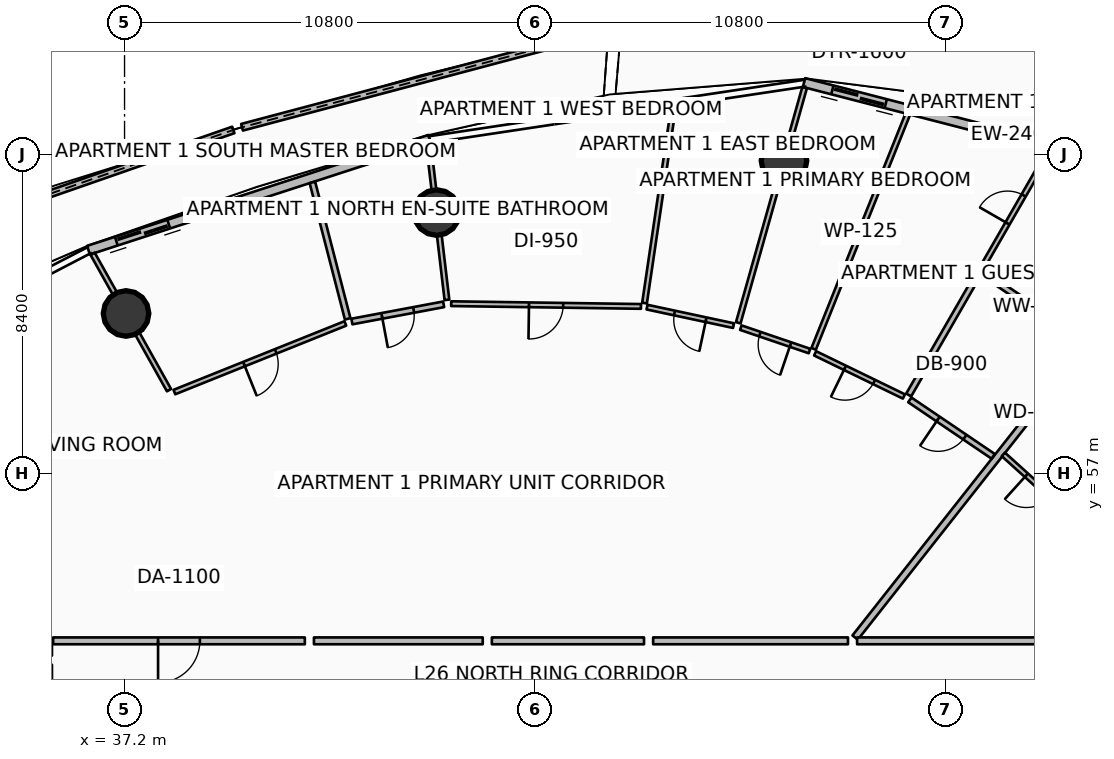
"""IFC4 building model, lengths in metres.
Left out: names, types, materials, properties, quantities, classifications, styles, units other than length and angle.
Written with IfcOpenShell. Run it as: python <this file> out.ifc"""

import sys

from ifc_helpers import new_model, si_unit, direction, frame, frame_2d, origin, origin_2d, place, context, subcontext, project, spatial, polyline, rectangle, circle, outline, extrude, element, fill, save


model = new_model("IFC4")
c1 = context("Model", 3, precision=1e-05, world=origin(), true_north=direction((0.0, 1.0)))
c2 = subcontext(c1, "Body", "Model", "MODEL_VIEW")
j1 = project(units=[si_unit("LENGTHUNIT", "METRE"), si_unit("PLANEANGLEUNIT", "RADIAN")], contexts=[c1])
p1 = place(None, origin())
s1 = spatial("IfcSite", under=j1, at=p1, CompositionType="ELEMENT")
p2 = place(p1, origin())
s2 = spatial("IfcBuilding", under=s1, at=p2, CompositionType="ELEMENT")
p3 = place(p2, frame((0.0, 0.0, 105.15)))
s3 = spatial("IfcBuildingStorey", under=s2, at=p3, CompositionType="ELEMENT", Elevation=105.15)
for number, where, z_axis, x_axis in (
    (1, (54.553, 65.234, 0.0), (0.0, 0.0, 1.0), (1.0, 0.0, 0.0)),
    (2, (45.412, 63.869, 0.0), (0.0, 0.0, 1.0), (1.0, 0.0, 0.0)),
    (3, (37.24, 61.214, 0.0), (0.0, 0.0, 1.0), (1.0, 0.0, 0.0)),
):
    element("IfcColumn", number, at=place(p3, frame(where, z_axis=z_axis, x_axis=x_axis)), inside=s3, PredefinedType="COLUMN", context=c2, shape_type="SweptSolid", body=[
        extrude(circle(Radius=0.6, at=origin_2d()), origin(), (0.0, 0.0, 1.0), 3.5),
    ])
p4 = place(p3, frame((49.935, 68.672, 0.0), z_axis=(0.0, 0.0, 1.0), x_axis=(-0.966557844724, -0.25644869429, 0.0)))
e4 = element("IfcWall", 4, at=p4, inside=s3, PredefinedType="PARAPET", context=c2, shape_type="SweptSolid", body=[
    extrude(outline(polyline([(0.0, 0.0), (9.978, 0.0), (9.978, 1.148), (4.989, 1.127), (0.0, 1.224), (0.0, 0.0)])), frame((0.0, 0.09, 0.0), z_axis=(0.0, -1.0, 0.0), x_axis=(1.0, 0.0, 0.0)), (0.0, 0.0, 1.0), 0.18),
])
p5 = place(p3, frame((40.062, 66.043, 0.0), z_axis=(0.0, 0.0, 1.0), x_axis=(-0.944336605893, -0.328980812161, 0.0)))
e5 = element("IfcWall", 5, at=p5, inside=s3, PredefinedType="PARAPET", context=c2, shape_type="SweptSolid", body=[
    extrude(outline(polyline([(0.0, 0.0), (10.102, 0.0), (10.102, 1.483), (5.051, 1.284), (0.0, 1.148), (0.0, 0.0)])), frame((0.0, 0.09, 0.0), z_axis=(0.0, -1.0, 0.0), x_axis=(1.0, 0.0, 0.0)), (0.0, 0.0, 1.0), 0.18),
])
p6 = place(p3, frame((65.814, 64.523, 0.0), z_axis=(0.0, 0.0, 1.0), x_axis=(-0.968356180858, 0.249572248045, 0.0)))
e6 = element("IfcWall", 6, at=p6, inside=s3, PredefinedType="SOLIDWALL", context=c2, shape_type="SweptSolid", body=[
    extrude(rectangle(XDim=11.084, YDim=0.24, at=frame_2d((5.542, 0.0))), origin(), (0.0, 0.0, 1.0), 2.45),
])
p7 = place(p6, frame((8.865, 0.0, 0.0)))
e7 = element("IfcOpeningElement", 7, at=p7, cuts=e6, PredefinedType="OPENING", context=c2, shape_type="SweptSolid", body=[
    extrude(rectangle(XDim=1.45, YDim=2.15, at=frame_2d((0.725, 1.075))), frame((0.0, 0.13, 0.0), z_axis=(0.0, -1.0, 0.0), x_axis=(1.0, 0.0, 0.0)), (0.0, 0.0, 1.0), 0.26),
])
p8 = place(p6, frame((0.28, 0.0, 0.65)))
e8 = element("IfcOpeningElement", 8, at=p8, cuts=e6, PredefinedType="OPENING", context=c2, shape_type="SweptSolid", body=[
    extrude(rectangle(XDim=1.6, YDim=1.5, at=frame_2d((0.8, 0.75))), frame((0.0, 0.13, 0.0), z_axis=(0.0, -1.0, 0.0), x_axis=(1.0, 0.0, 0.0)), (0.0, 0.0, 1.0), 0.26),
])
p9 = place(p3, frame((45.233, 65.797, 0.0), z_axis=(0.0, 0.0, 1.0), x_axis=(-0.951052494852, -0.30902937083, 0.0)))
e9 = element("IfcWall", 9, at=p9, inside=s3, PredefinedType="SOLIDWALL", context=c2, shape_type="SweptSolid", body=[
    extrude(rectangle(XDim=9.444, YDim=0.24, at=frame_2d((4.722, 0.0))), origin(), (0.0, 0.0, 1.0), 2.45),
])
p10 = place(p9, frame((7.224, 0.0, 0.0)))
e10 = element("IfcOpeningElement", 10, at=p10, cuts=e9, PredefinedType="OPENING", context=c2, shape_type="SweptSolid", body=[
    extrude(rectangle(XDim=1.45, YDim=2.15, at=frame_2d((0.725, 1.075))), frame((0.0, 0.13, 0.0), z_axis=(0.0, -1.0, 0.0), x_axis=(1.0, 0.0, 0.0)), (0.0, 0.0, 1.0), 0.26),
])
p11 = place(p9, frame((0.28, 0.0, 0.65)))
e11 = element("IfcOpeningElement", 11, at=p11, cuts=e9, PredefinedType="OPENING", context=c2, shape_type="SweptSolid", body=[
    extrude(rectangle(XDim=1.6, YDim=1.5, at=frame_2d((0.8, 0.75))), frame((0.0, 0.13, 0.0), z_axis=(0.0, -1.0, 0.0), x_axis=(1.0, 0.0, 0.0)), (0.0, 0.0, 1.0), 0.26),
])
p12 = place(p3, frame((56.425, 52.686, 0.0), z_axis=(0.0, 0.0, 1.0), x_axis=(0.619083417853, 0.785325233098, 0.0)))
e12 = element("IfcWall", 12, at=p12, inside=s3, PredefinedType="PARTITIONING", context=c2, shape_type="SweptSolid", body=[
    extrude(rectangle(XDim=15.063, YDim=0.18, at=frame_2d((7.532, 0.0))), origin(), (0.0, 0.0, 1.0), 2.94),
])
p13 = place(p3, frame((41.944, 52.6, 0.0), z_axis=(0.0, 0.0, 1.0), x_axis=(-1.0, 0.0, 0.0)))
e13 = element("IfcWall", 13, at=p13, inside=s3, PredefinedType="PARTITIONING", context=c2, shape_type="SweptSolid", body=[
    extrude(rectangle(XDim=6.624, YDim=0.18, at=frame_2d((3.312, 0.0))), origin(), (0.0, 0.0, 1.0), 2.94),
])
p14 = place(p13, frame((2.762, 0.0, 0.0)))
e14 = element("IfcOpeningElement", 14, at=p14, cuts=e13, PredefinedType="OPENING", context=c2, shape_type="SweptSolid", body=[
    extrude(rectangle(XDim=1.1, YDim=2.1, at=frame_2d((0.55, 1.05))), frame((0.0, 0.1, 0.0), z_axis=(0.0, -1.0, 0.0), x_axis=(1.0, 0.0, 0.0)), (0.0, 0.0, 1.0), 0.2),
])
p15 = place(p3, frame((56.236, 52.6, 0.0), z_axis=(0.0, 0.0, 1.0), x_axis=(-1.0, 0.0, 0.0)))
e15 = element("IfcWall", 15, at=p15, inside=s3, PredefinedType="PARTITIONING", context=c2, shape_type="SweptSolid", body=[
    extrude(rectangle(XDim=5.127, YDim=0.18, at=frame_2d((2.563, 0.0))), origin(), (0.0, 0.0, 1.0), 2.94),
])
p16 = place(p3, frame((60.057, 57.455, 0.0), z_axis=(0.0, 0.0, 1.0), x_axis=(-0.828073269886, 0.560619888783, 0.0)))
e16 = element("IfcWall", 16, at=p16, inside=s3, PredefinedType="PARTITIONING", context=c2, shape_type="SweptSolid", body=[
    extrude(rectangle(XDim=2.649, YDim=0.15, at=frame_2d((1.324, 0.0))), origin(), (0.0, 0.0, 1.0), 2.94),
])
p17 = place(p16, frame((0.899, 0.0, 0.0)))
e17 = element("IfcOpeningElement", 17, at=p17, cuts=e16, PredefinedType="OPENING", context=c2, shape_type="SweptSolid", body=[
    extrude(rectangle(XDim=0.85, YDim=2.06, at=frame_2d((0.425, 1.03))), frame((0.0, 0.085, 0.0), z_axis=(0.0, -1.0, 0.0), x_axis=(1.0, 0.0, 0.0)), (0.0, 0.0, 1.0), 0.17),
])
p18 = place(p3, frame((62.44, 60.479, 0.0), z_axis=(0.0, 0.0, 1.0), x_axis=(-0.828057808374, 0.560642725798, 0.0)))
e18 = element("IfcWall", 18, at=p18, inside=s3, PredefinedType="PARTITIONING", context=c2, shape_type="SweptSolid", body=[
    extrude(rectangle(XDim=3.206, YDim=0.15, at=frame_2d((1.603, 0.0))), origin(), (0.0, 0.0, 1.0), 2.94),
])
p19 = place(p3, frame((57.834, 59.069, 0.0), z_axis=(0.0, 0.0, 1.0), x_axis=(0.49925269443, 0.866456431164, 0.0)))
e19 = element("IfcWall", 19, at=p19, inside=s3, PredefinedType="PARTITIONING", context=c2, shape_type="SweptSolid", body=[
    extrude(rectangle(XDim=3.72, YDim=0.15, at=frame_2d((1.86, 0.0))), origin(), (0.0, 0.0, 1.0), 2.94),
])
p20 = place(p3, frame((59.756, 62.405, 0.0), z_axis=(0.0, 0.0, 1.0), x_axis=(0.499189934721, 0.866492590316, 0.0)))
e20 = element("IfcWall", 20, at=p20, inside=s3, PredefinedType="PARTITIONING", context=c2, shape_type="SweptSolid", body=[
    extrude(rectangle(XDim=3.573, YDim=0.125, at=frame_2d((1.786, 0.0))), origin(), (0.0, 0.0, 1.0), 2.94),
])
p21 = place(p20, frame((1.361, 0.0, 0.0)))
e21 = element("IfcOpeningElement", 21, at=p21, cuts=e20, PredefinedType="OPENING", context=c2, shape_type="SweptSolid", body=[
    extrude(rectangle(XDim=0.85, YDim=2.06, at=frame_2d((0.425, 1.03))), frame((0.0, 0.073, 0.0), z_axis=(0.0, -1.0, 0.0), x_axis=(1.0, 0.0, 0.0)), (0.0, 0.0, 1.0), 0.145),
])
p22 = place(p3, frame((55.333, 60.283, 0.0), z_axis=(0.0, 0.0, 1.0), x_axis=(0.372282601369, 0.928119423737, 0.0)))
e22 = element("IfcWall", 22, at=p22, inside=s3, PredefinedType="PARTITIONING", context=c2, shape_type="SweptSolid", body=[
    extrude(rectangle(XDim=6.653, YDim=0.125, at=frame_2d((3.327, 0.0))), origin(), (0.0, 0.0, 1.0), 2.94),
])
p23 = place(p3, frame((57.708, 59.03, 0.0), z_axis=(0.0, 0.0, 1.0), x_axis=(-0.899555648673, 0.436806175484, 0.0)))
e23 = element("IfcWall", 23, at=p23, inside=s3, PredefinedType="PARTITIONING", context=c2, shape_type="SweptSolid", body=[
    extrude(rectangle(XDim=2.597, YDim=0.125, at=frame_2d((1.299, 0.0))), origin(), (0.0, 0.0, 1.0), 2.94),
])
p24 = place(p23, frame((0.874, 0.0, 0.0)))
e24 = element("IfcOpeningElement", 24, at=p24, cuts=e23, PredefinedType="OPENING", context=c2, shape_type="SweptSolid", body=[
    extrude(rectangle(XDim=0.85, YDim=2.06, at=frame_2d((0.425, 1.03))), frame((0.0, 0.073, 0.0), z_axis=(0.0, -1.0, 0.0), x_axis=(1.0, 0.0, 0.0)), (0.0, 0.0, 1.0), 0.145),
])
p25 = place(p3, frame((55.224, 60.226, 0.0), z_axis=(0.0, 0.0, 1.0), x_axis=(-0.946642431702, 0.322285752866, 0.0)))
e25 = element("IfcWall", 25, at=p25, inside=s3, PredefinedType="PARTITIONING", context=c2, shape_type="SweptSolid", body=[
    extrude(rectangle(XDim=1.908, YDim=0.125, at=frame_2d((0.954, 0.0))), origin(), (0.0, 0.0, 1.0), 2.94),
])
p26 = place(p25, frame((0.529, 0.0, 0.0)))
e26 = element("IfcOpeningElement", 26, at=p26, cuts=e25, PredefinedType="OPENING", context=c2, shape_type="SweptSolid", body=[
    extrude(rectangle(XDim=0.85, YDim=2.06, at=frame_2d((0.425, 1.03))), frame((0.0, 0.073, 0.0), z_axis=(0.0, -1.0, 0.0), x_axis=(1.0, 0.0, 0.0)), (0.0, 0.0, 1.0), 0.145),
])
p27 = place(p3, frame((50.869, 52.6, 0.0), z_axis=(0.0, 0.0, 1.0), x_axis=(-1.0, 0.0, 0.0)))
e27 = element("IfcWall", 27, at=p27, inside=s3, PredefinedType="PARTITIONING", context=c2, shape_type="SweptSolid", body=[
    extrude(rectangle(XDim=4.004, YDim=0.18, at=frame_2d((2.002, 0.0))), origin(), (0.0, 0.0, 1.0), 2.94),
])
p28 = place(p3, frame((53.35, 60.969, 0.0), z_axis=(0.0, 0.0, 1.0), x_axis=(0.271449341275, 0.962452728772, 0.0)))
e28 = element("IfcWall", 28, at=p28, inside=s3, PredefinedType="PARTITIONING", context=c2, shape_type="SweptSolid", body=[
    extrude(rectangle(XDim=6.429, YDim=0.125, at=frame_2d((3.214, 0.0))), origin(), (0.0, 0.0, 1.0), 2.94),
])
p29 = place(p3, frame((50.883, 61.487, 0.0), z_axis=(0.0, 0.0, 1.0), x_axis=(0.146319984384, 0.989237313373, 0.0)))
e29 = element("IfcWall", 29, at=p29, inside=s3, PredefinedType="PARTITIONING", context=c2, shape_type="SweptSolid", body=[
    extrude(rectangle(XDim=5.301, YDim=0.125, at=frame_2d((2.65, 0.0))), origin(), (0.0, 0.0, 1.0), 2.94),
])
p30 = place(p3, frame((53.225, 60.894, 0.0), z_axis=(0.0, 0.0, 1.0), x_axis=(-0.977859146171, 0.209264163799, 0.0)))
e30 = element("IfcWall", 30, at=p30, inside=s3, PredefinedType="PARTITIONING", context=c2, shape_type="SweptSolid", body=[
    extrude(rectangle(XDim=2.329, YDim=0.125, at=frame_2d((1.164, 0.0))), origin(), (0.0, 0.0, 1.0), 2.94),
])
p31 = place(p30, frame((0.739, 0.0, 0.0)))
e31 = element("IfcOpeningElement", 31, at=p31, cuts=e30, PredefinedType="OPENING", context=c2, shape_type="SweptSolid", body=[
    extrude(rectangle(XDim=0.85, YDim=2.06, at=frame_2d((0.425, 1.03))), frame((0.0, 0.073, 0.0), z_axis=(0.0, -1.0, 0.0), x_axis=(1.0, 0.0, 0.0)), (0.0, 0.0, 1.0), 0.145),
])
p32 = place(p3, frame((50.79, 61.399, 0.0), z_axis=(0.0, 0.0, 1.0), x_axis=(-0.999894626753, 0.014516727973, 0.0)))
e32 = element("IfcWall", 32, at=p32, inside=s3, PredefinedType="PARTITIONING", context=c2, shape_type="SweptSolid", body=[
    extrude(rectangle(XDim=4.995, YDim=0.125, at=frame_2d((2.498, 0.0))), origin(), (0.0, 0.0, 1.0), 2.94),
])
p33 = place(p32, frame((2.048, 0.0, 0.0)))
e33 = element("IfcOpeningElement", 33, at=p33, cuts=e32, PredefinedType="OPENING", context=c2, shape_type="SweptSolid", body=[
    extrude(rectangle(XDim=0.9, YDim=2.08, at=frame_2d((0.45, 1.04))), frame((0.0, 0.073, 0.0), z_axis=(0.0, -1.0, 0.0), x_axis=(1.0, 0.0, 0.0)), (0.0, 0.0, 1.0), 0.145),
])
p34 = place(p3, frame((46.625, 52.6, 0.0), z_axis=(0.0, 0.0, 1.0), x_axis=(-1.0, 0.0, 0.0)))
e34 = element("IfcWall", 34, at=p34, inside=s3, PredefinedType="PARTITIONING", context=c2, shape_type="SweptSolid", body=[
    extrude(rectangle(XDim=4.442, YDim=0.18, at=frame_2d((2.221, 0.0))), origin(), (0.0, 0.0, 1.0), 2.94),
])
p35 = place(p3, frame((45.683, 61.573, 0.0), z_axis=(0.0, 0.0, 1.0), x_axis=(-0.117513626782, 0.993071270111, 0.0)))
e35 = element("IfcWall", 35, at=p35, inside=s3, PredefinedType="PARTITIONING", context=c2, shape_type="SweptSolid", body=[
    extrude(rectangle(XDim=4.213, YDim=0.125, at=frame_2d((2.107, 0.0))), origin(), (0.0, 0.0, 1.0), 2.94),
])
p36 = place(p3, frame((38.37, 59.196, 0.0), z_axis=(0.0, 0.0, 1.0), x_axis=(-0.488603368932, 0.87250601595, 0.0)))
e36 = element("IfcWall", 36, at=p36, inside=s3, PredefinedType="PARTITIONING", context=c2, shape_type="SweptSolid", body=[
    extrude(rectangle(XDim=4.113, YDim=0.125, at=frame_2d((2.057, 0.0))), origin(), (0.0, 0.0, 1.0), 2.94),
])
p37 = place(p3, frame((45.597, 61.455, 0.0), z_axis=(0.0, 0.0, 1.0), x_axis=(-0.982882310082, -0.18423453674, 0.0)))
e37 = element("IfcWall", 37, at=p37, inside=s3, PredefinedType="PARTITIONING", context=c2, shape_type="SweptSolid", body=[
    extrude(rectangle(XDim=2.457, YDim=0.15, at=frame_2d((1.229, 0.0))), origin(), (0.0, 0.0, 1.0), 2.94),
])
p38 = place(p37, frame((0.803, 0.0, 0.0)))
e38 = element("IfcOpeningElement", 38, at=p38, cuts=e37, PredefinedType="OPENING", context=c2, shape_type="SweptSolid", body=[
    extrude(rectangle(XDim=0.85, YDim=2.06, at=frame_2d((0.425, 1.03))), frame((0.0, 0.085, 0.0), z_axis=(0.0, -1.0, 0.0), x_axis=(1.0, 0.0, 0.0)), (0.0, 0.0, 1.0), 0.17),
])
p39 = place(p3, frame((43.071, 61.073, 0.0), z_axis=(0.0, 0.0, 1.0), x_axis=(-0.250228515302, 0.968186805389, 0.0)))
e39 = element("IfcWall", 39, at=p39, inside=s3, PredefinedType="PARTITIONING", context=c2, shape_type="SweptSolid", body=[
    extrude(rectangle(XDim=3.708, YDim=0.15, at=frame_2d((1.854, 0.0))), origin(), (0.0, 0.0, 1.0), 2.94),
])
p40 = place(p3, frame((43.01, 60.952, 0.0), z_axis=(0.0, 0.0, 1.0), x_axis=(-0.9280140097, -0.372545296307, 0.0)))
e40 = element("IfcWall", 40, at=p40, inside=s3, PredefinedType="PARTITIONING", context=c2, shape_type="SweptSolid", body=[
    extrude(rectangle(XDim=4.847, YDim=0.125, at=frame_2d((2.424, 0.0))), origin(), (0.0, 0.0, 1.0), 2.94),
])
p41 = place(p40, frame((1.974, 0.0, 0.0)))
e41 = element("IfcOpeningElement", 41, at=p41, cuts=e40, PredefinedType="OPENING", context=c2, shape_type="SweptSolid", body=[
    extrude(rectangle(XDim=0.9, YDim=2.08, at=frame_2d((0.45, 1.04))), frame((0.0, 0.073, 0.0), z_axis=(0.0, -1.0, 0.0), x_axis=(1.0, 0.0, 0.0)), (0.0, 0.0, 1.0), 0.145),
])
p42 = place(p3, frame((61.53, 52.6, 0.0), z_axis=(0.0, 0.0, 1.0), x_axis=(-1.0, 0.0, 0.0)))
e42 = element("IfcWall", 42, at=p42, inside=s3, PredefinedType="PARTITIONING", context=c2, shape_type="SweptSolid", body=[
    extrude(rectangle(XDim=5.054, YDim=0.18, at=frame_2d((2.527, 0.0))), origin(), (0.0, 0.0, 1.0), 2.94),
])
p43 = place(p3, frame((62.168, 55.841, 0.0), z_axis=(0.0, 0.0, 1.0), x_axis=(-0.742266682882, 0.67010459742, 0.0)))
e43 = element("IfcWall", 43, at=p43, inside=s3, PredefinedType="PARTITIONING", context=c2, shape_type="SweptSolid", body=[
    extrude(rectangle(XDim=2.483, YDim=0.125, at=frame_2d((1.242, 0.0))), origin(), (0.0, 0.0, 1.0), 2.94),
])
p44 = place(p43, frame((0.817, 0.0, 0.0)))
e44 = element("IfcOpeningElement", 44, at=p44, cuts=e43, PredefinedType="OPENING", context=c2, shape_type="SweptSolid", body=[
    extrude(rectangle(XDim=0.85, YDim=2.06, at=frame_2d((0.425, 1.03))), frame((0.0, 0.073, 0.0), z_axis=(0.0, -1.0, 0.0), x_axis=(1.0, 0.0, 0.0)), (0.0, 0.0, 1.0), 0.145),
])
p45 = place(p7, origin())
e45 = element("IfcDoor", 45, at=p45, inside=s3, OperationType="DOUBLE_DOOR_SLIDING", PredefinedType="DOOR", context=c2, shape_type="SweptSolid", body=[
    extrude(rectangle(XDim=1.45, YDim=2.15, at=frame_2d((0.725, 1.075))), frame((0.0, 0.025, 0.0), z_axis=(0.0, -1.0, 0.0), x_axis=(1.0, 0.0, 0.0)), (0.0, 0.0, 1.0), 0.05),
])
fill(e7, e45)
p46 = place(p10, origin())
e46 = element("IfcDoor", 46, at=p46, inside=s3, OperationType="DOUBLE_DOOR_SLIDING", PredefinedType="DOOR", context=c2, shape_type="SweptSolid", body=[
    extrude(rectangle(XDim=1.45, YDim=2.15, at=frame_2d((0.725, 1.075))), frame((0.0, 0.025, 0.0), z_axis=(0.0, -1.0, 0.0), x_axis=(1.0, 0.0, 0.0)), (0.0, 0.0, 1.0), 0.05),
])
fill(e10, e46)
p47 = place(p11, origin())
e47 = element("IfcWindow", 47, at=p47, inside=s3, PartitioningType="SINGLE_PANEL", PredefinedType="WINDOW", context=c2, shape_type="SweptSolid", body=[
    extrude(rectangle(XDim=1.6, YDim=1.5, at=frame_2d((0.8, 0.75))), frame((0.0, 0.03, 0.0), z_axis=(0.0, -1.0, 0.0), x_axis=(1.0, 0.0, 0.0)), (0.0, 0.0, 1.0), 0.06),
])
fill(e11, e47)
p48 = place(p14, origin())
e48 = element("IfcDoor", 48, at=p48, inside=s3, OperationType="SINGLE_SWING_RIGHT", PredefinedType="DOOR", context=c2, shape_type="SweptSolid", body=[
    extrude(rectangle(XDim=1.1, YDim=2.1, at=frame_2d((0.55, 1.05))), frame((0.0, 0.025, 0.0), z_axis=(0.0, -1.0, 0.0), x_axis=(1.0, 0.0, 0.0)), (0.0, 0.0, 1.0), 0.05),
])
fill(e14, e48)
p49 = place(p17, origin())
e49 = element("IfcDoor", 49, at=p49, inside=s3, OperationType="SINGLE_SWING_RIGHT", PredefinedType="DOOR", context=c2, shape_type="SweptSolid", body=[
    extrude(rectangle(XDim=0.85, YDim=2.06, at=frame_2d((0.425, 1.03))), frame((0.0, 0.025, 0.0), z_axis=(0.0, -1.0, 0.0), x_axis=(1.0, 0.0, 0.0)), (0.0, 0.0, 1.0), 0.05),
])
fill(e17, e49)
p50 = place(p21, origin())
e50 = element("IfcDoor", 50, at=p50, inside=s3, OperationType="SINGLE_SWING_LEFT", PredefinedType="DOOR", context=c2, shape_type="SweptSolid", body=[
    extrude(rectangle(XDim=0.85, YDim=2.06, at=frame_2d((0.425, 1.03))), frame((0.0, 0.025, 0.0), z_axis=(0.0, -1.0, 0.0), x_axis=(1.0, 0.0, 0.0)), (0.0, 0.0, 1.0), 0.05),
])
fill(e21, e50)
p51 = place(p24, origin())
e51 = element("IfcDoor", 51, at=p51, inside=s3, OperationType="SINGLE_SWING_RIGHT", PredefinedType="DOOR", context=c2, shape_type="SweptSolid", body=[
    extrude(rectangle(XDim=0.85, YDim=2.06, at=frame_2d((0.425, 1.03))), frame((0.0, 0.025, 0.0), z_axis=(0.0, -1.0, 0.0), x_axis=(1.0, 0.0, 0.0)), (0.0, 0.0, 1.0), 0.05),
])
fill(e24, e51)
p52 = place(p26, origin())
e52 = element("IfcDoor", 52, at=p52, inside=s3, OperationType="SINGLE_SWING_LEFT", PredefinedType="DOOR", context=c2, shape_type="SweptSolid", body=[
    extrude(rectangle(XDim=0.85, YDim=2.06, at=frame_2d((0.425, 1.03))), frame((0.0, 0.025, 0.0), z_axis=(0.0, -1.0, 0.0), x_axis=(1.0, 0.0, 0.0)), (0.0, 0.0, 1.0), 0.05),
])
fill(e26, e52)
p53 = place(p31, origin())
e53 = element("IfcDoor", 53, at=p53, inside=s3, OperationType="SINGLE_SWING_LEFT", PredefinedType="DOOR", context=c2, shape_type="SweptSolid", body=[
    extrude(rectangle(XDim=0.85, YDim=2.06, at=frame_2d((0.425, 1.03))), frame((0.0, 0.025, 0.0), z_axis=(0.0, -1.0, 0.0), x_axis=(1.0, 0.0, 0.0)), (0.0, 0.0, 1.0), 0.05),
])
fill(e31, e53)
p54 = place(p33, origin())
e54 = element("IfcDoor", 54, at=p54, inside=s3, OperationType="SINGLE_SWING_RIGHT", PredefinedType="DOOR", context=c2, shape_type="SweptSolid", body=[
    extrude(rectangle(XDim=0.9, YDim=2.08, at=frame_2d((0.45, 1.04))), frame((0.0, 0.025, 0.0), z_axis=(0.0, -1.0, 0.0), x_axis=(1.0, 0.0, 0.0)), (0.0, 0.0, 1.0), 0.05),
])
fill(e33, e54)
p55 = place(p38, origin())
e55 = element("IfcDoor", 55, at=p55, inside=s3, OperationType="SINGLE_SWING_RIGHT", PredefinedType="DOOR", context=c2, shape_type="SweptSolid", body=[
    extrude(rectangle(XDim=0.85, YDim=2.06, at=frame_2d((0.425, 1.03))), frame((0.0, 0.025, 0.0), z_axis=(0.0, -1.0, 0.0), x_axis=(1.0, 0.0, 0.0)), (0.0, 0.0, 1.0), 0.05),
])
fill(e38, e55)
p56 = place(p41, origin())
e56 = element("IfcDoor", 56, at=p56, inside=s3, OperationType="SINGLE_SWING_RIGHT", PredefinedType="DOOR", context=c2, shape_type="SweptSolid", body=[
    extrude(rectangle(XDim=0.9, YDim=2.08, at=frame_2d((0.45, 1.04))), frame((0.0, 0.025, 0.0), z_axis=(0.0, -1.0, 0.0), x_axis=(1.0, 0.0, 0.0)), (0.0, 0.0, 1.0), 0.05),
])
fill(e41, e56)
p57 = place(p44, origin())
e57 = element("IfcDoor", 57, at=p57, inside=s3, OperationType="SINGLE_SWING_RIGHT", PredefinedType="DOOR", context=c2, shape_type="SweptSolid", body=[
    extrude(rectangle(XDim=0.85, YDim=2.06, at=frame_2d((0.425, 1.03))), frame((0.0, 0.025, 0.0), z_axis=(0.0, -1.0, 0.0), x_axis=(1.0, 0.0, 0.0)), (0.0, 0.0, 1.0), 0.05),
])
fill(e44, e57)
save(model, sys.argv[1])
